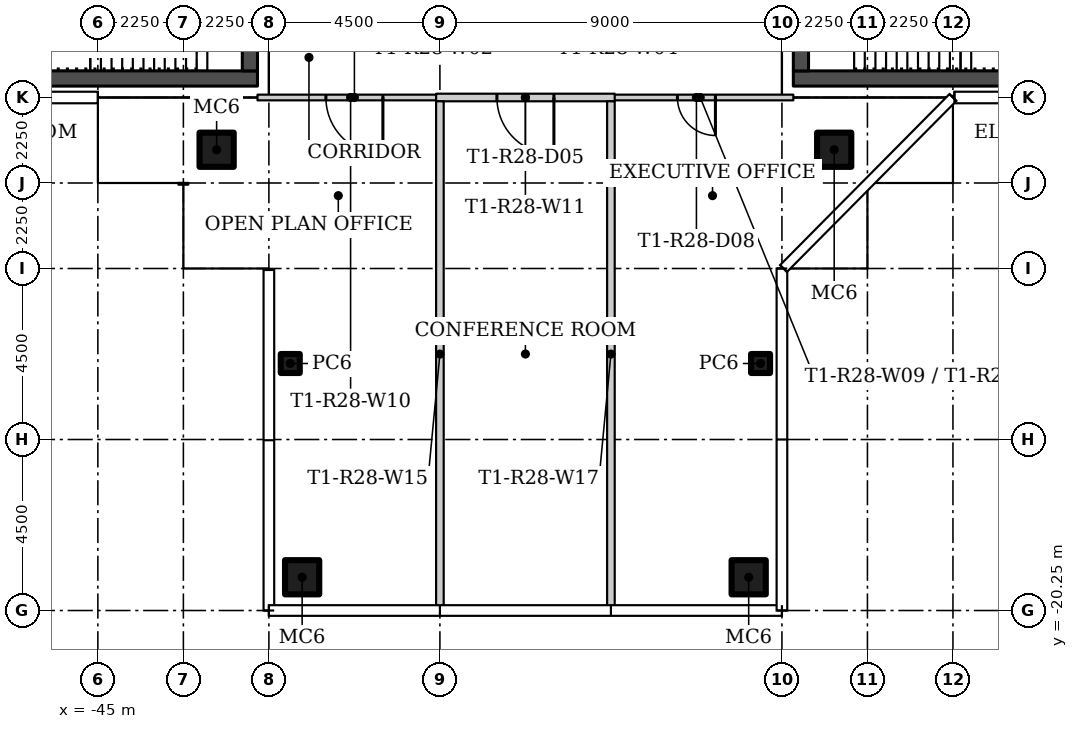
"""IFC4 building model, lengths in metres.
Left out: names, types, materials, properties, quantities, classifications, styles, units other than length and angle.
Written with IfcOpenShell. Run it as: python <this file> out.ifc"""

import sys

from ifc_helpers import new_model, si_unit, direction, frame, frame_2d, origin, origin_2d, place, context, subcontext, project, spatial, rectangle, hollow_rectangle, extrude, element, fill, save


model = new_model("IFC4")
c1 = context("Model", 3, precision=1e-05, world=origin(), true_north=direction((0.0, 1.0)))
c2 = subcontext(c1, "Body", "Model", "MODEL_VIEW")
j1 = project(units=[si_unit("LENGTHUNIT", "METRE"), si_unit("PLANEANGLEUNIT", "RADIAN")], contexts=[c1])
p1 = place(None, origin())
s1 = spatial("IfcSite", under=j1, at=p1, CompositionType="ELEMENT")
p2 = place(p1, origin())
s2 = spatial("IfcBuilding", under=s1, at=p2, CompositionType="ELEMENT")
p3 = place(p2, frame((0.0, 0.0, 257.7)))
s3 = spatial("IfcBuildingStorey", under=s2, at=p3, CompositionType="ELEMENT", Elevation=257.7)
for number, where in (
    (1, (-25.625, -8.125, 0.0)),
    (2, (-41.875, -8.125, 0.0)),
):
    element("IfcColumn", number, at=place(p3, frame(where)), inside=s3, PredefinedType="COLUMN", context=c2, shape_type="SweptSolid", body=[
        extrude(hollow_rectangle(XDim=0.9, YDim=0.9, WallThickness=0.036, at=origin_2d()), origin(), (0.0, 0.0, 1.0), 3.55),
    ])
p4 = place(p3, frame((-39.938, -13.75, 0.0)))
e3 = element("IfcColumn", 3, at=p4, inside=s3, PredefinedType="COLUMN", context=c2, shape_type="SweptSolid", body=[
    extrude(hollow_rectangle(XDim=0.5, YDim=0.5, WallThickness=0.016, at=origin_2d()), origin(), (0.0, 0.0, 1.0), 3.55),
])
p5 = place(p3, frame((-39.625, -19.375, 0.0)))
e4 = element("IfcColumn", 4, at=p5, inside=s3, PredefinedType="COLUMN", context=c2, shape_type="SweptSolid", body=[
    extrude(hollow_rectangle(XDim=0.9, YDim=0.9, WallThickness=0.036, at=origin_2d()), origin(), (0.0, 0.0, 1.0), 3.55),
])
p6 = place(p3, frame((-27.562, -13.75, 0.0)))
e5 = element("IfcColumn", 5, at=p6, inside=s3, PredefinedType="COLUMN", context=c2, shape_type="SweptSolid", body=[
    extrude(hollow_rectangle(XDim=0.5, YDim=0.5, WallThickness=0.016, at=origin_2d()), origin(), (0.0, 0.0, 1.0), 3.55),
])
p7 = place(p3, frame((-27.875, -19.375, 0.0)))
e6 = element("IfcColumn", 6, at=p7, inside=s3, PredefinedType="COLUMN", context=c2, shape_type="SweptSolid", body=[
    extrude(hollow_rectangle(XDim=0.9, YDim=0.9, WallThickness=0.036, at=origin_2d()), origin(), (0.0, 0.0, 1.0), 3.55),
])
p8 = place(p3, frame((-26.7, -6.75, 0.0), z_axis=(0.0, 0.0, 1.0), x_axis=(-1.0, 0.0, 0.0)))
e7 = element("IfcWall", 7, at=p8, inside=s3, PredefinedType="PARTITIONING", context=c2, shape_type="SweptSolid", body=[
    extrude(rectangle(XDim=4.9, YDim=0.15, at=frame_2d((2.45, 0.0))), origin(), (0.0, 0.0, 1.0), 3.55),
])
p9 = place(p8, frame((2.05, 0.0, 0.0)))
e8 = element("IfcOpeningElement", 8, at=p9, cuts=e7, PredefinedType="OPENING", context=c2, shape_type="SweptSolid", body=[
    extrude(rectangle(XDim=1.0, YDim=2.4, at=frame_2d((0.5, 1.2))), frame((0.0, 0.085, 0.0), z_axis=(0.0, -1.0, 0.0), x_axis=(1.0, 0.0, 0.0)), (0.0, 0.0, 1.0), 0.17),
])
p10 = place(p3, frame((-35.9, -6.75, 0.0), z_axis=(0.0, 0.0, 1.0), x_axis=(-1.0, 0.0, 0.0)))
e9 = element("IfcWall", 9, at=p10, inside=s3, PredefinedType="PARTITIONING", context=c2, shape_type="SweptSolid", body=[
    extrude(rectangle(XDim=4.9, YDim=0.15, at=frame_2d((2.45, 0.0))), origin(), (0.0, 0.0, 1.0), 3.55),
])
p11 = place(p10, frame((1.6, 0.0, 0.0)))
e10 = element("IfcOpeningElement", 10, at=p11, cuts=e9, PredefinedType="OPENING", context=c2, shape_type="SweptSolid", body=[
    extrude(rectangle(XDim=1.5, YDim=2.1, at=frame_2d((0.75, 1.05))), frame((0.0, 0.085, 0.0), z_axis=(0.0, -1.0, 0.0), x_axis=(1.0, 0.0, 0.0)), (0.0, 0.0, 1.0), 0.17),
])
p12 = place(p3, frame((-31.4, -6.75, 0.0), z_axis=(0.0, 0.0, 1.0), x_axis=(-1.0, 0.0, 0.0)))
e11 = element("IfcWall", 11, at=p12, inside=s3, PredefinedType="PARTITIONING", context=c2, shape_type="SweptSolid", body=[
    extrude(rectangle(XDim=4.7, YDim=0.2, at=frame_2d((2.35, 0.0))), origin(), (0.0, 0.0, 1.0), 3.55),
])
p13 = place(p12, frame((1.6, 0.0, 0.0)))
e12 = element("IfcOpeningElement", 12, at=p13, cuts=e11, PredefinedType="OPENING", context=c2, shape_type="SweptSolid", body=[
    extrude(rectangle(XDim=1.5, YDim=2.4, at=frame_2d((0.75, 1.2))), frame((0.0, 0.11, 0.0), z_axis=(0.0, -1.0, 0.0), x_axis=(1.0, 0.0, 0.0)), (0.0, 0.0, 1.0), 0.22),
])
for number, where, z_axis, x_axis in (
    (13, (-36.0, -20.155, 0.0), (0.0, 0.0, 1.0), (0.0, 1.0, 0.0)),
    (14, (-31.5, -20.155, 0.0), (0.0, 0.0, 1.0), (0.0, 1.0, 0.0)),
):
    element("IfcWall", number, at=place(p3, frame(where, z_axis=z_axis, x_axis=x_axis)), inside=s3, PredefinedType="PARTITIONING", context=c2, shape_type="SweptSolid", body=[
        extrude(rectangle(XDim=13.305, YDim=0.2, at=frame_2d((6.652, 0.0))), origin(), (0.0, 0.0, 1.0), 3.55),
    ])
p14 = place(p3, frame((-26.7, -6.25, 0.0)))
e15 = element("IfcWall", 15, at=p14, inside=s3, PredefinedType="SHEAR", context=c2, shape_type="SweptSolid", body=[
    extrude(rectangle(XDim=12.9, YDim=0.4, at=frame_2d((6.45, 0.0))), origin(), (0.0, 0.0, 1.0), 3.55),
])
p15 = place(p3, frame((-26.5, 6.05, 0.0), z_axis=(0.0, 0.0, 1.0), x_axis=(0.0, -1.0, 0.0)))
e16 = element("IfcWall", 16, at=p15, inside=s3, PredefinedType="SHEAR", context=c2, shape_type="SweptSolid", body=[
    extrude(rectangle(XDim=12.1, YDim=0.4, at=frame_2d((6.05, 0.0))), origin(), (0.0, 0.0, 1.0), 3.55),
])
p16 = place(p15, frame((3.9, 0.0, 0.0)))
e17 = element("IfcOpeningElement", 17, at=p16, cuts=e16, PredefinedType="OPENING", context=c2, shape_type="SweptSolid", body=[
    extrude(rectangle(XDim=1.8, YDim=2.4, at=frame_2d((0.9, 1.2))), frame((0.0, 0.21, 0.0), z_axis=(0.0, -1.0, 0.0), x_axis=(1.0, 0.0, 0.0)), (0.0, 0.0, 1.0), 0.42),
])
p17 = place(p3, frame((-40.8, -6.25, 0.0), z_axis=(0.0, 0.0, 1.0), x_axis=(-1.0, 0.0, 0.0)))
e18 = element("IfcWall", 18, at=p17, inside=s3, PredefinedType="SHEAR", context=c2, shape_type="SweptSolid", body=[
    extrude(rectangle(XDim=12.9, YDim=0.4, at=frame_2d((6.45, 0.0))), origin(), (0.0, 0.0, 1.0), 3.55),
])
p18 = place(p3, frame((-41.0, -6.05, 0.0), z_axis=(0.0, 0.0, 1.0), x_axis=(0.0, 1.0, 0.0)))
e19 = element("IfcWall", 19, at=p18, inside=s3, PredefinedType="SHEAR", context=c2, shape_type="SweptSolid", body=[
    extrude(rectangle(XDim=12.1, YDim=0.4, at=frame_2d((6.05, 0.0))), origin(), (0.0, 0.0, 1.0), 3.55),
])
p19 = place(p18, frame((6.4, 0.0, 0.0)))
e20 = element("IfcOpeningElement", 20, at=p19, cuts=e19, PredefinedType="OPENING", context=c2, shape_type="SweptSolid", body=[
    extrude(rectangle(XDim=1.8, YDim=2.4, at=frame_2d((0.9, 1.2))), frame((0.0, 0.21, 0.0), z_axis=(0.0, -1.0, 0.0), x_axis=(1.0, 0.0, 0.0)), (0.0, 0.0, 1.0), 0.42),
])
p20 = place(p11, origin())
e21 = element("IfcDoor", 21, at=p20, inside=s3, OperationType="DOUBLE_DOOR_SINGLE_SWING", PredefinedType="DOOR", context=c2, shape_type="SweptSolid", body=[
    extrude(rectangle(XDim=1.5, YDim=2.1, at=frame_2d((0.75, 1.05))), frame((0.0, 0.025, 0.0), z_axis=(0.0, -1.0, 0.0), x_axis=(1.0, 0.0, 0.0)), (0.0, 0.0, 1.0), 0.05),
])
fill(e10, e21)
p21 = place(p13, origin())
e22 = element("IfcDoor", 22, at=p21, inside=s3, OperationType="DOUBLE_DOOR_SINGLE_SWING", PredefinedType="DOOR", context=c2, shape_type="SweptSolid", body=[
    extrude(rectangle(XDim=1.5, YDim=2.4, at=frame_2d((0.75, 1.2))), frame((0.0, 0.025, 0.0), z_axis=(0.0, -1.0, 0.0), x_axis=(1.0, 0.0, 0.0)), (0.0, 0.0, 1.0), 0.05),
])
fill(e12, e22)
p22 = place(p9, origin())
e23 = element("IfcDoor", 23, at=p22, inside=s3, OperationType="SINGLE_SWING_LEFT", PredefinedType="DOOR", context=c2, shape_type="SweptSolid", body=[
    extrude(rectangle(XDim=1.0, YDim=2.4, at=frame_2d((0.5, 1.2))), frame((0.0, 0.025, 0.0), z_axis=(0.0, -1.0, 0.0), x_axis=(1.0, 0.0, 0.0)), (0.0, 0.0, 1.0), 0.05),
])
fill(e8, e23)
save(model, sys.argv[1])
